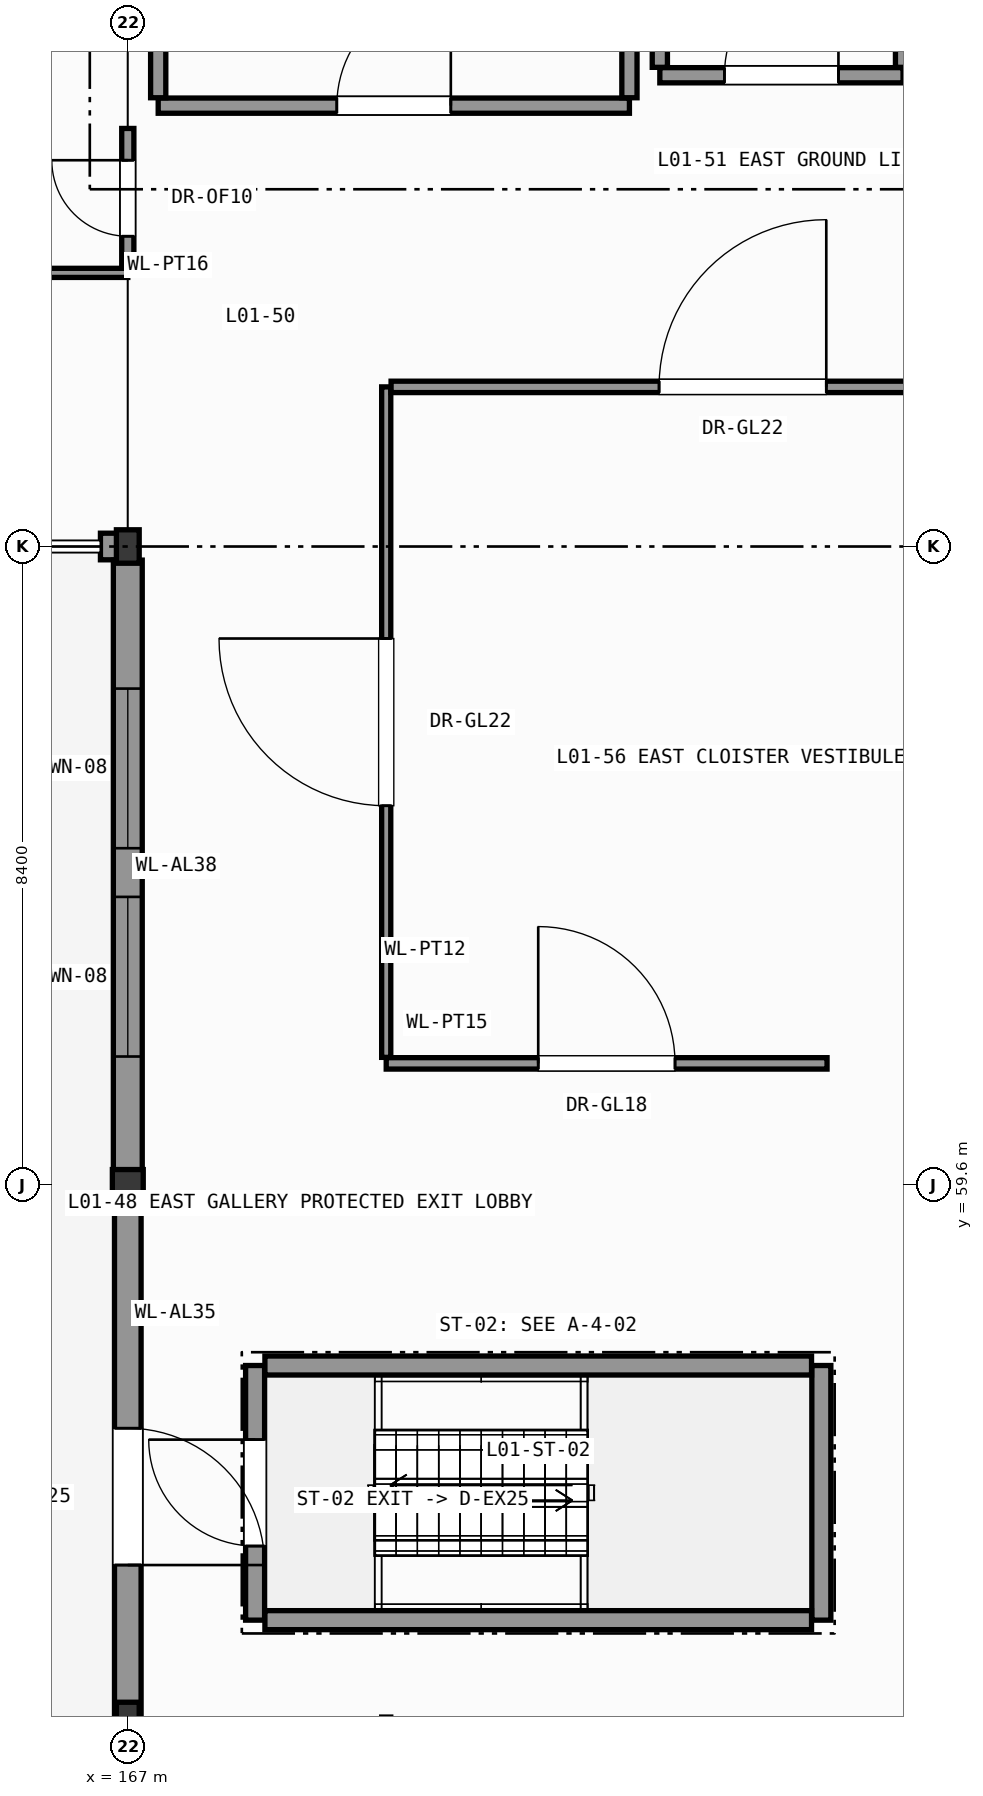
"""IFC4 building model, lengths in metres.
Left out: names, types, materials, properties, quantities, classifications, styles, units other than length and angle.
Written with IfcOpenShell. Run it as: python <this file> out.ifc"""

import sys

from ifc_helpers import new_model, si_unit, direction, frame, frame_2d, origin, origin_2d, place, context, subcontext, project, spatial, rectangle, hollow_circle, i_section, extrude, element, fill, save


model = new_model("IFC4")
c1 = context("Model", 3, precision=1e-05, world=origin(), true_north=direction((0.0, 1.0)))
c2 = subcontext(c1, "Body", "Model", "MODEL_VIEW")
j1 = project(units=[si_unit("LENGTHUNIT", "METRE"), si_unit("PLANEANGLEUNIT", "RADIAN")], contexts=[c1])
p1 = place(None, origin())
s1 = spatial("IfcSite", under=j1, at=p1, CompositionType="ELEMENT")
p2 = place(p1, origin())
s2 = spatial("IfcBuilding", under=s1, at=p2, CompositionType="ELEMENT")
p3 = place(p2, origin())
s3 = spatial("IfcBuildingStorey", under=s2, at=p3, CompositionType="ELEMENT", Elevation=0.0)
p4 = place(p3, frame((167.0, 52.6, 0.0), z_axis=(0.0, 0.0, 1.0), x_axis=(1.0, 0.0, 0.0)))
e1 = element("IfcColumn", 1, at=p4, inside=s3, PredefinedType="COLUMN", context=c2, shape_type="SweptSolid", body=[
    extrude(i_section(OverallWidth=0.3, OverallDepth=0.39, WebThickness=0.011, FlangeThickness=0.019, FilletRadius=0.027, at=origin_2d()), origin(), (0.0, 0.0, 1.0), 7.8),
])
p5 = place(p3, frame((167.0, 59.6, 0.0), z_axis=(0.0, 0.0, 1.0), x_axis=(1.0, 0.0, 0.0)))
e2 = element("IfcColumn", 2, at=p5, inside=s3, PredefinedType="COLUMN", context=c2, shape_type="SweptSolid", body=[
    extrude(hollow_circle(Radius=0.203, WallThickness=0.02, at=origin_2d()), origin(), (0.0, 0.0, 1.0), 7.8),
])
p6 = place(p3, frame((167.0, 68.0, 0.0), z_axis=(0.0, 0.0, 1.0), x_axis=(1.0, 0.0, 0.0)))
e3 = element("IfcColumn", 3, at=p6, inside=s3, PredefinedType="COLUMN", context=c2, shape_type="SweptSolid", body=[
    extrude(i_section(OverallWidth=0.3, OverallDepth=0.44, WebThickness=0.011, FlangeThickness=0.021, FilletRadius=0.027, at=origin_2d()), origin(), (0.0, 0.0, 1.0), 7.8),
])
p7 = place(p3, frame((166.64, 68.0, 0.0), z_axis=(0.0, 0.0, 1.0), x_axis=(1.0, 0.0, 0.0)))
e4 = element("IfcWall", 4, at=p7, inside=s3, PredefinedType="SOLIDWALL", context=c2, shape_type="SweptSolid", body=[
    extrude(rectangle(XDim=0.36, YDim=0.35, at=frame_2d((0.18, 0.0))), origin(), (0.0, 0.0, 1.0), 6.925),
])
p8 = place(p3, frame((167.0, 59.6, 0.0), z_axis=(0.0, 0.0, 1.0), x_axis=(0.0, 1.0, 0.0)))
e5 = element("IfcWall", 5, at=p8, inside=s3, PredefinedType="SOLIDWALL", context=c2, shape_type="SweptSolid", body=[
    extrude(rectangle(XDim=8.221, YDim=0.38, at=frame_2d((4.11, 0.0))), origin(), (0.0, 0.0, 1.0), 7.085),
])
p9 = place(p8, frame((1.69, 0.0, 0.95)))
e6 = element("IfcOpeningElement", 6, at=p9, cuts=e5, PredefinedType="OPENING", context=c2, shape_type="SweptSolid", body=[
    extrude(rectangle(XDim=2.1, YDim=2.8, at=frame_2d((1.05, 1.4))), frame((0.0, 0.2, 0.0), z_axis=(0.0, -1.0, 0.0), x_axis=(1.0, 0.0, 0.0)), (0.0, 0.0, 1.0), 0.4),
])
p10 = place(p8, frame((4.431, 0.0, 0.95)))
e7 = element("IfcOpeningElement", 7, at=p10, cuts=e5, PredefinedType="OPENING", context=c2, shape_type="SweptSolid", body=[
    extrude(rectangle(XDim=2.1, YDim=2.8, at=frame_2d((1.05, 1.4))), frame((0.0, 0.2, 0.0), z_axis=(0.0, -1.0, 0.0), x_axis=(1.0, 0.0, 0.0)), (0.0, 0.0, 1.0), 0.4),
])
p11 = place(p3, frame((167.0, 52.6, 0.0), z_axis=(0.0, 0.0, 1.0), x_axis=(0.0, 1.0, 0.0)))
e8 = element("IfcWall", 8, at=p11, inside=s3, PredefinedType="SOLIDWALL", context=c2, shape_type="SweptSolid", body=[
    extrude(rectangle(XDim=7.0, YDim=0.35, at=frame_2d((3.5, 0.0))), origin(), (0.0, 0.0, 1.0), 7.235),
])
p12 = place(p11, frame((2.0, 0.0, 0.0)))
e9 = element("IfcOpeningElement", 9, at=p12, cuts=e8, PredefinedType="OPENING", context=c2, shape_type="SweptSolid", body=[
    extrude(rectangle(XDim=1.8, YDim=2.4, at=frame_2d((0.9, 1.2))), frame((0.0, 0.185, 0.0), z_axis=(0.0, -1.0, 0.0), x_axis=(1.0, 0.0, 0.0)), (0.0, 0.0, 1.0), 0.37),
])
p13 = place(p3, frame((168.675, 53.875, 0.0), z_axis=(0.0, 0.0, 1.0), x_axis=(0.0, 1.0, 0.0)))
e10 = element("IfcWall", 10, at=p13, inside=s3, PredefinedType="SHEAR", context=c2, shape_type="SweptSolid", body=[
    extrude(rectangle(XDim=3.35, YDim=0.25, at=frame_2d((1.675, 0.0))), origin(), (0.0, 0.0, 1.0), 7.54),
])
p14 = place(p13, frame((0.975, 0.0, 0.0)))
e11 = element("IfcOpeningElement", 11, at=p14, cuts=e10, PredefinedType="OPENING", context=c2, shape_type="SweptSolid", body=[
    extrude(rectangle(XDim=1.4, YDim=2.2, at=frame_2d((0.7, 1.1))), frame((0.0, 0.135, 0.0), z_axis=(0.0, -1.0, 0.0), x_axis=(1.0, 0.0, 0.0)), (0.0, 0.0, 1.0), 0.27),
])
p15 = place(p3, frame((176.125, 53.875, 0.0), z_axis=(0.0, 0.0, 1.0), x_axis=(0.0, 1.0, 0.0)))
e12 = element("IfcWall", 12, at=p15, inside=s3, PredefinedType="SHEAR", context=c2, shape_type="SweptSolid", body=[
    extrude(rectangle(XDim=3.35, YDim=0.25, at=frame_2d((1.675, 0.0))), origin(), (0.0, 0.0, 1.0), 7.54),
])
for number, where, z_axis, x_axis in (
    (13, (168.804, 53.875, 0.0), (0.0, 0.0, 1.0), (1.0, 0.0, 0.0)),
    (14, (168.804, 57.225, 0.0), (0.0, 0.0, 1.0), (1.0, 0.0, 0.0)),
):
    element("IfcWall", number, at=place(p3, frame(where, z_axis=z_axis, x_axis=x_axis)), inside=s3, PredefinedType="SHEAR", context=c2, shape_type="SweptSolid", body=[
        extrude(rectangle(XDim=7.192, YDim=0.25, at=frame_2d((3.596, 0.0))), origin(), (0.0, 0.0, 1.0), 7.54),
    ])
p16 = place(p3, frame((167.4, 73.8, 0.0), z_axis=(0.0, 0.0, 1.0), x_axis=(1.0, 0.0, 0.0)))
e15 = element("IfcWall", 15, at=p16, inside=s3, PredefinedType="PARTITIONING", context=c2, shape_type="SweptSolid", body=[
    extrude(rectangle(XDim=6.2, YDim=0.2, at=frame_2d((3.1, 0.0))), origin(), (0.0, 0.0, 1.0), 7.165),
])
p17 = place(p16, frame((2.35, 0.0, 0.0)))
e16 = element("IfcOpeningElement", 16, at=p17, cuts=e15, PredefinedType="OPENING", context=c2, shape_type="SweptSolid", body=[
    extrude(rectangle(XDim=1.5, YDim=2.2, at=frame_2d((0.75, 1.1))), frame((0.0, 0.11, 0.0), z_axis=(0.0, -1.0, 0.0), x_axis=(1.0, 0.0, 0.0)), (0.0, 0.0, 1.0), 0.22),
])
for number, where, z_axis, x_axis in (
    (17, (167.4, 73.904, 0.0), (0.0, 0.0, 1.0), (0.0, 1.0, 0.0)),
    (18, (173.6, 73.904, 0.0), (0.0, 0.0, 1.0), (0.0, 1.0, 0.0)),
):
    element("IfcWall", number, at=place(p3, frame(where, z_axis=z_axis, x_axis=x_axis)), inside=s3, PredefinedType="PARTITIONING", context=c2, shape_type="SweptSolid", body=[
        extrude(rectangle(XDim=4.296, YDim=0.2, at=frame_2d((2.148, 0.0))), origin(), (0.0, 0.0, 1.0), 7.54),
    ])
p18 = place(p3, frame((174.0, 74.2, 0.0), z_axis=(0.0, 0.0, 1.0), x_axis=(1.0, 0.0, 0.0)))
e19 = element("IfcWall", 19, at=p18, inside=s3, PredefinedType="PARTITIONING", context=c2, shape_type="SweptSolid", body=[
    extrude(rectangle(XDim=3.2, YDim=0.2, at=frame_2d((1.6, 0.0))), origin(), (0.0, 0.0, 1.0), 7.54),
])
p19 = place(p18, frame((0.85, 0.0, 0.0)))
e20 = element("IfcOpeningElement", 20, at=p19, cuts=e19, PredefinedType="OPENING", context=c2, shape_type="SweptSolid", body=[
    extrude(rectangle(XDim=1.5, YDim=2.2, at=frame_2d((0.75, 1.1))), frame((0.0, 0.11, 0.0), z_axis=(0.0, -1.0, 0.0), x_axis=(1.0, 0.0, 0.0)), (0.0, 0.0, 1.0), 0.22),
])
for number, where, z_axis, x_axis in (
    (21, (174.0, 74.304, 0.0), (0.0, 0.0, 1.0), (0.0, 1.0, 0.0)),
    (22, (177.2, 74.304, 0.0), (0.0, 0.0, 1.0), (0.0, 1.0, 0.0)),
):
    element("IfcWall", number, at=place(p3, frame(where, z_axis=z_axis, x_axis=x_axis)), inside=s3, PredefinedType="PARTITIONING", context=c2, shape_type="SweptSolid", body=[
        extrude(rectangle(XDim=3.896, YDim=0.2, at=frame_2d((1.948, 0.0))), origin(), (0.0, 0.0, 1.0), 7.54),
    ])
p20 = place(p3, frame((126.0, 71.6, 0.0), z_axis=(0.0, 0.0, 1.0), x_axis=(1.0, 0.0, 0.0)))
e23 = element("IfcWall", 23, at=p20, inside=s3, PredefinedType="PARTITIONING", context=c2, shape_type="SweptSolid", body=[
    extrude(rectangle(XDim=41.0, YDim=0.12, at=frame_2d((20.5, 0.0))), origin(), (0.0, 0.0, 1.0), 7.54),
])
p21 = place(p20, frame((19.4, 0.0, 0.0)))
e24 = element("IfcOpeningElement", 24, at=p21, cuts=e23, PredefinedType="OPENING", context=c2, shape_type="SweptSolid", body=[
    extrude(rectangle(XDim=2.2, YDim=2.6, at=frame_2d((1.1, 1.3))), frame((0.0, 0.07, 0.0), z_axis=(0.0, -1.0, 0.0), x_axis=(1.0, 0.0, 0.0)), (0.0, 0.0, 1.0), 0.14),
])
p22 = place(p3, frame((167.0, 71.664, 0.0), z_axis=(0.0, 0.0, 1.0), x_axis=(0.0, 1.0, 0.0)))
e25 = element("IfcWall", 25, at=p22, inside=s3, PredefinedType="PARTITIONING", context=c2, shape_type="SweptSolid", body=[
    extrude(rectangle(XDim=1.836, YDim=0.16, at=frame_2d((0.918, 0.0))), origin(), (0.0, 0.0, 1.0), 7.085),
])
p23 = place(p22, frame((0.418, 0.0, 0.0)))
e26 = element("IfcOpeningElement", 26, at=p23, cuts=e25, PredefinedType="OPENING", context=c2, shape_type="SweptSolid", body=[
    extrude(rectangle(XDim=1.0, YDim=2.15, at=frame_2d((0.5, 1.075))), frame((0.0, 0.09, 0.0), z_axis=(0.0, -1.0, 0.0), x_axis=(1.0, 0.0, 0.0)), (0.0, 0.0, 1.0), 0.18),
])
p24 = place(p3, frame((170.4, 61.2, 0.0), z_axis=(0.0, 0.0, 1.0), x_axis=(1.0, 0.0, 0.0)))
e27 = element("IfcWall", 27, at=p24, inside=s3, PredefinedType="PARTITIONING", context=c2, shape_type="SweptSolid", body=[
    extrude(rectangle(XDim=5.8, YDim=0.15, at=frame_2d((2.9, 0.0))), origin(), (0.0, 0.0, 1.0), 7.54),
])
p25 = place(p24, frame((2.0, 0.0, 0.0)))
e28 = element("IfcOpeningElement", 28, at=p25, cuts=e27, PredefinedType="OPENING", context=c2, shape_type="SweptSolid", body=[
    extrude(rectangle(XDim=1.8, YDim=2.4, at=frame_2d((0.9, 1.2))), frame((0.0, 0.085, 0.0), z_axis=(0.0, -1.0, 0.0), x_axis=(1.0, 0.0, 0.0)), (0.0, 0.0, 1.0), 0.17),
])
p26 = place(p3, frame((170.4, 61.279, 0.0), z_axis=(0.0, 0.0, 1.0), x_axis=(0.0, 1.0, 0.0)))
e29 = element("IfcWall", 29, at=p26, inside=s3, PredefinedType="PARTITIONING", context=c2, shape_type="SweptSolid", body=[
    extrude(rectangle(XDim=8.821, YDim=0.12, at=frame_2d((4.411, 0.0))), origin(), (0.0, 0.0, 1.0), 7.54),
])
p27 = place(p26, frame((3.311, 0.0, 0.0)))
e30 = element("IfcOpeningElement", 30, at=p27, cuts=e29, PredefinedType="OPENING", context=c2, shape_type="SweptSolid", body=[
    extrude(rectangle(XDim=2.2, YDim=2.6, at=frame_2d((1.1, 1.3))), frame((0.0, 0.07, 0.0), z_axis=(0.0, -1.0, 0.0), x_axis=(1.0, 0.0, 0.0)), (0.0, 0.0, 1.0), 0.14),
])
p28 = place(p3, frame((170.464, 70.1, 0.0), z_axis=(0.0, 0.0, 1.0), x_axis=(1.0, 0.0, 0.0)))
e31 = element("IfcWall", 31, at=p28, inside=s3, PredefinedType="PARTITIONING", context=c2, shape_type="SweptSolid", body=[
    extrude(rectangle(XDim=9.252, YDim=0.15, at=frame_2d((4.626, 0.0))), origin(), (0.0, 0.0, 1.0), 7.54),
])
p29 = place(p28, frame((3.526, 0.0, 0.0)))
e32 = element("IfcOpeningElement", 32, at=p29, cuts=e31, PredefinedType="OPENING", context=c2, shape_type="SweptSolid", body=[
    extrude(rectangle(XDim=2.2, YDim=2.6, at=frame_2d((1.1, 1.3))), frame((0.0, 0.085, 0.0), z_axis=(0.0, -1.0, 0.0), x_axis=(1.0, 0.0, 0.0)), (0.0, 0.0, 1.0), 0.17),
])
p30 = place(p3, frame((170.4, 15.284, 0.0), z_axis=(0.0, 0.0, 1.0), x_axis=(0.0, 1.0, 0.0)))
e33 = element("IfcWall", 33, at=p30, inside=s3, PredefinedType="PARTITIONING", context=c2, shape_type="SweptSolid", body=[
    extrude(rectangle(XDim=37.316, YDim=0.12, at=frame_2d((18.658, 0.0))), origin(), (0.0, 0.0, 1.0), 7.54),
])
p31 = place(p30, frame((17.558, 0.0, 0.0)))
e34 = element("IfcOpeningElement", 34, at=p31, cuts=e33, PredefinedType="OPENING", context=c2, shape_type="SweptSolid", body=[
    extrude(rectangle(XDim=2.2, YDim=2.6, at=frame_2d((1.1, 1.3))), frame((0.0, 0.07, 0.0), z_axis=(0.0, -1.0, 0.0), x_axis=(1.0, 0.0, 0.0)), (0.0, 0.0, 1.0), 0.14),
])
p32 = place(p9, origin())
e35 = element("IfcWindow", 35, at=p32, inside=s3, PartitioningType="SINGLE_PANEL", PredefinedType="WINDOW", context=c2, shape_type="SweptSolid", body=[
    extrude(rectangle(XDim=2.1, YDim=2.8, at=frame_2d((1.05, 1.4))), frame((0.0, 0.03, 0.0), z_axis=(0.0, -1.0, 0.0), x_axis=(1.0, 0.0, 0.0)), (0.0, 0.0, 1.0), 0.06),
])
fill(e6, e35)
p33 = place(p10, origin())
e36 = element("IfcWindow", 36, at=p33, inside=s3, PartitioningType="SINGLE_PANEL", PredefinedType="WINDOW", context=c2, shape_type="SweptSolid", body=[
    extrude(rectangle(XDim=2.1, YDim=2.8, at=frame_2d((1.05, 1.4))), frame((0.0, 0.03, 0.0), z_axis=(0.0, -1.0, 0.0), x_axis=(1.0, 0.0, 0.0)), (0.0, 0.0, 1.0), 0.06),
])
fill(e7, e36)
p34 = place(p12, origin())
e37 = element("IfcDoor", 37, at=p34, inside=s3, OperationType="SINGLE_SWING_LEFT", PredefinedType="DOOR", context=c2, shape_type="SweptSolid", body=[
    extrude(rectangle(XDim=1.8, YDim=2.4, at=frame_2d((0.9, 1.2))), frame((0.0, 0.025, 0.0), z_axis=(0.0, -1.0, 0.0), x_axis=(1.0, 0.0, 0.0)), (0.0, 0.0, 1.0), 0.05),
])
fill(e9, e37)
p35 = place(p14, origin())
e38 = element("IfcDoor", 38, at=p35, inside=s3, OperationType="SINGLE_SWING_RIGHT", PredefinedType="DOOR", context=c2, shape_type="SweptSolid", body=[
    extrude(rectangle(XDim=1.4, YDim=2.2, at=frame_2d((0.7, 1.1))), frame((0.0, 0.025, 0.0), z_axis=(0.0, -1.0, 0.0), x_axis=(1.0, 0.0, 0.0)), (0.0, 0.0, 1.0), 0.05),
])
fill(e11, e38)
p36 = place(p17, origin())
e39 = element("IfcDoor", 39, at=p36, inside=s3, OperationType="SINGLE_SWING_RIGHT", PredefinedType="DOOR", context=c2, shape_type="SweptSolid", body=[
    extrude(rectangle(XDim=1.5, YDim=2.2, at=frame_2d((0.75, 1.1))), frame((0.0, 0.025, 0.0), z_axis=(0.0, -1.0, 0.0), x_axis=(1.0, 0.0, 0.0)), (0.0, 0.0, 1.0), 0.05),
])
fill(e16, e39)
p37 = place(p19, origin())
e40 = element("IfcDoor", 40, at=p37, inside=s3, OperationType="SINGLE_SWING_RIGHT", PredefinedType="DOOR", context=c2, shape_type="SweptSolid", body=[
    extrude(rectangle(XDim=1.5, YDim=2.2, at=frame_2d((0.75, 1.1))), frame((0.0, 0.025, 0.0), z_axis=(0.0, -1.0, 0.0), x_axis=(1.0, 0.0, 0.0)), (0.0, 0.0, 1.0), 0.05),
])
fill(e20, e40)
p38 = place(p23, origin())
e41 = element("IfcDoor", 41, at=p38, inside=s3, OperationType="SINGLE_SWING_RIGHT", PredefinedType="DOOR", context=c2, shape_type="SweptSolid", body=[
    extrude(rectangle(XDim=1.0, YDim=2.15, at=frame_2d((0.5, 1.075))), frame((0.0, 0.025, 0.0), z_axis=(0.0, -1.0, 0.0), x_axis=(1.0, 0.0, 0.0)), (0.0, 0.0, 1.0), 0.05),
])
fill(e26, e41)
p39 = place(p25, origin())
e42 = element("IfcDoor", 42, at=p39, inside=s3, OperationType="SINGLE_SWING_LEFT", PredefinedType="DOOR", context=c2, shape_type="SweptSolid", body=[
    extrude(rectangle(XDim=1.8, YDim=2.4, at=frame_2d((0.9, 1.2))), frame((0.0, 0.025, 0.0), z_axis=(0.0, -1.0, 0.0), x_axis=(1.0, 0.0, 0.0)), (0.0, 0.0, 1.0), 0.05),
])
fill(e28, e42)
p40 = place(p27, origin())
e43 = element("IfcDoor", 43, at=p40, inside=s3, OperationType="SINGLE_SWING_RIGHT", PredefinedType="DOOR", context=c2, shape_type="SweptSolid", body=[
    extrude(rectangle(XDim=2.2, YDim=2.6, at=frame_2d((1.1, 1.3))), frame((0.0, 0.025, 0.0), z_axis=(0.0, -1.0, 0.0), x_axis=(1.0, 0.0, 0.0)), (0.0, 0.0, 1.0), 0.05),
])
fill(e30, e43)
p41 = place(p29, origin())
e44 = element("IfcDoor", 44, at=p41, inside=s3, OperationType="SINGLE_SWING_RIGHT", PredefinedType="DOOR", context=c2, shape_type="SweptSolid", body=[
    extrude(rectangle(XDim=2.2, YDim=2.6, at=frame_2d((1.1, 1.3))), frame((0.0, 0.025, 0.0), z_axis=(0.0, -1.0, 0.0), x_axis=(1.0, 0.0, 0.0)), (0.0, 0.0, 1.0), 0.05),
])
fill(e32, e44)
save(model, sys.argv[1])
